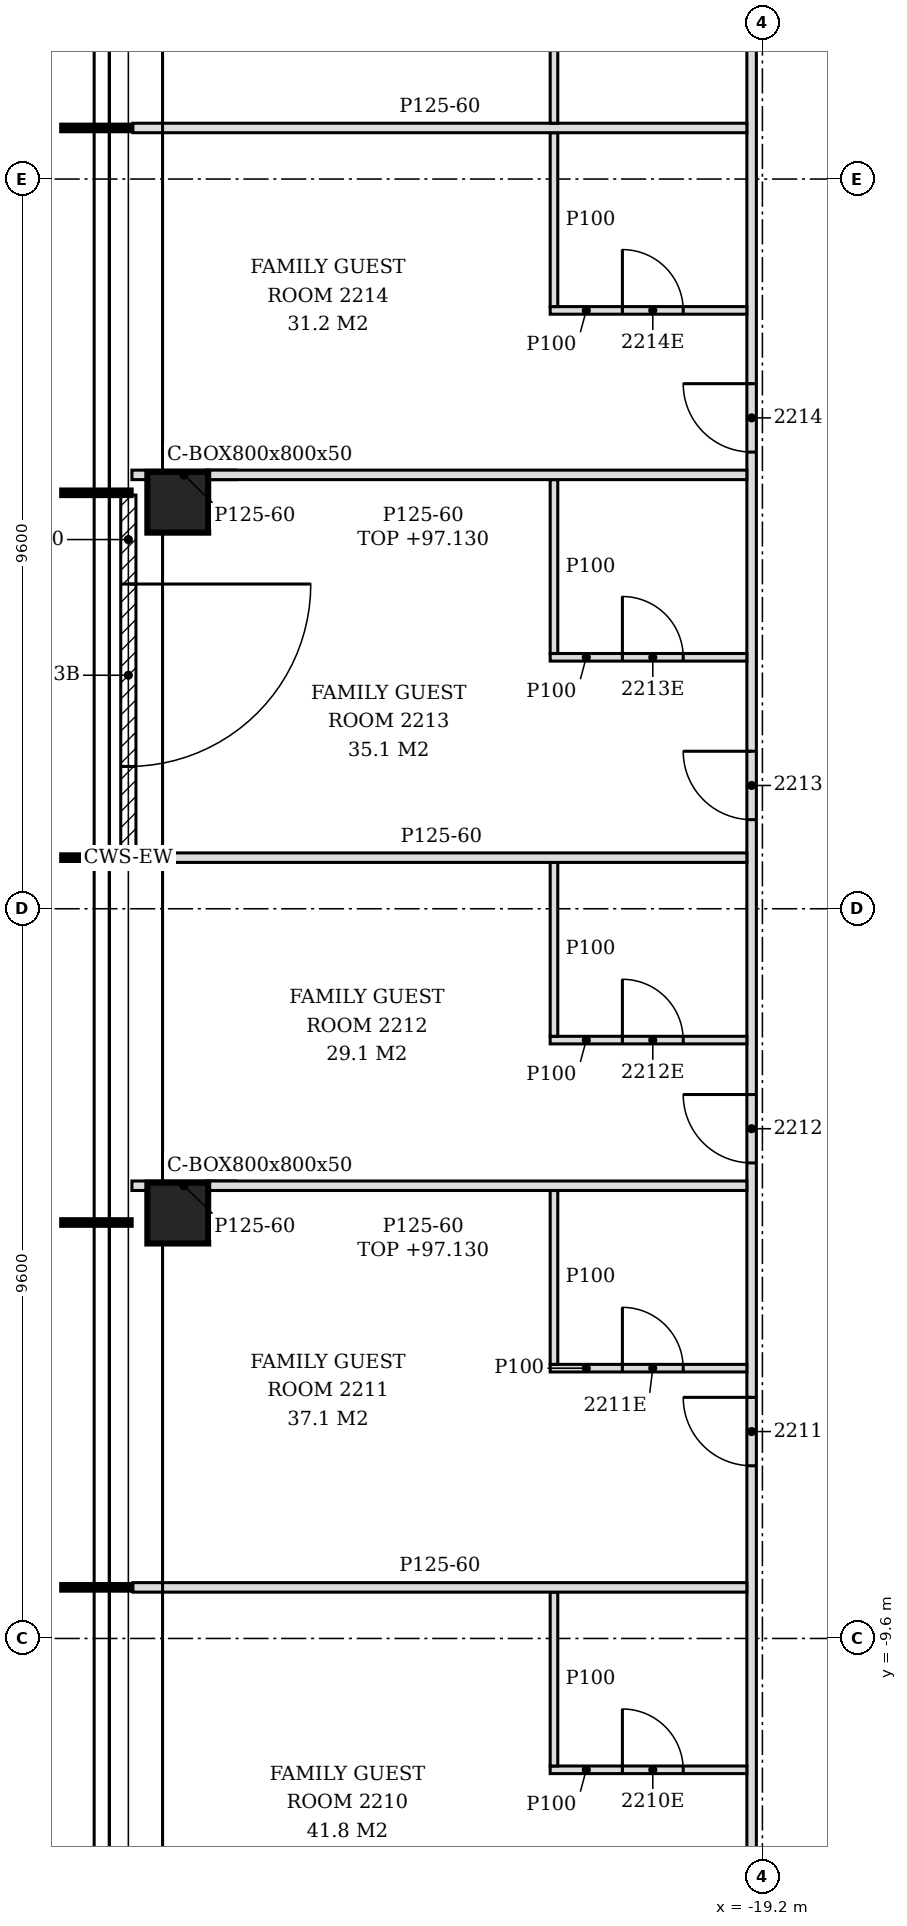
"""IFC4 building model, lengths in metres.
Left out: names, types, materials, properties, quantities, classifications, styles, units other than length and angle.
Written with IfcOpenShell. Run it as: python <this file> out.ifc"""

import sys

from ifc_helpers import new_model, si_unit, direction, frame, frame_2d, origin, origin_2d, place, context, subcontext, project, spatial, polyline, rectangle, hollow_rectangle, outline, extrude, clip, halfspace, element, fill, save


model = new_model("IFC4")
c1 = context("Model", 3, precision=1e-05, world=origin(), true_north=direction((0.0, 1.0)))
c2 = subcontext(c1, "Body", "Model", "MODEL_VIEW")
j1 = project(units=[si_unit("LENGTHUNIT", "METRE"), si_unit("PLANEANGLEUNIT", "RADIAN")], contexts=[c1])
p1 = place(None, origin())
s1 = spatial("IfcSite", under=j1, at=p1, CompositionType="ELEMENT")
p2 = place(p1, origin())
s2 = spatial("IfcBuilding", under=s1, at=p2, CompositionType="ELEMENT")
p3 = place(p2, frame((0.0, 0.0, 94.2)))
s3 = spatial("IfcBuildingStorey", under=s2, at=p3, CompositionType="ELEMENT", Elevation=94.2)
p4 = place(p3, frame((-26.892, 5.348, -0.15), z_axis=(0.281903412306, 0.18797814682, 0.940847852975), x_axis=(-0.554787109556, 0.83199234556, 0.0)))
e1 = element("IfcColumn", 1, at=p4, inside=s3, PredefinedType="COLUMN", context=c2, shape_type="Clipping", body=[
    clip(clip(extrude(hollow_rectangle(XDim=0.8, YDim=0.8, WallThickness=0.05, at=origin_2d()), origin(), (0.0, 0.0, 1.0), 3.826), halfspace(frame((0.0, 0.0, 0.024), z_axis=(0.0, 0.0, 1.0), x_axis=(1.0, 0.0, 0.0)), True)), halfspace(frame((0.0, 0.0, 3.802), z_axis=(0.0, 0.0, 1.0), x_axis=(1.0, 0.0, 0.0)), False)),
])
p5 = place(p3, frame((-26.892, -4.003, -0.15), z_axis=(0.281906793082, 0.187916592491, 0.940859136258), x_axis=(-0.554656732749, 0.832079268349, 0.0)))
e2 = element("IfcColumn", 2, at=p5, inside=s3, PredefinedType="COLUMN", context=c2, shape_type="Clipping", body=[
    clip(clip(extrude(hollow_rectangle(XDim=0.8, YDim=0.8, WallThickness=0.05, at=origin_2d()), origin(), (0.0, 0.0, 1.0), 3.826), halfspace(frame((0.0, 0.0, 0.024), z_axis=(0.0, 0.0, 1.0), x_axis=(1.0, 0.0, 0.0)), True)), halfspace(frame((0.0, 0.0, 3.802), z_axis=(0.0, 0.0, 1.0), x_axis=(1.0, 0.0, 0.0)), False)),
])
p6 = place(p3, frame((-26.892, -13.355, -0.15), z_axis=(0.281903412306, 0.18797814682, 0.940847852975), x_axis=(-0.554787109556, 0.83199234556, 0.0)))
e3 = element("IfcColumn", 3, at=p6, inside=s3, PredefinedType="COLUMN", context=c2, shape_type="Clipping", body=[
    clip(clip(extrude(hollow_rectangle(XDim=0.8, YDim=0.8, WallThickness=0.05, at=origin_2d()), origin(), (0.0, 0.0, 1.0), 3.826), halfspace(frame((0.0, 0.0, 0.024), z_axis=(0.0, 0.0, 1.0), x_axis=(1.0, 0.0, 0.0)), True)), halfspace(frame((0.0, 0.0, 3.802), z_axis=(0.0, 0.0, 1.0), x_axis=(1.0, 0.0, 0.0)), False)),
])
p7 = place(p3, frame((-27.542, 5.442, 0.0), z_axis=(0.0, 0.0, 1.0), x_axis=(0.0, -1.0, 0.0)))
e4 = element("IfcWall", 4, at=p7, inside=s3, PredefinedType="NOTDEFINED", context=c2, shape_type="SweptSolid", body=[
    extrude(rectangle(XDim=4.74, YDim=0.2, at=frame_2d((2.37, 0.0))), origin(), (0.0, 0.0, 1.0), 3.45),
])
p8 = place(p7, frame((1.17, 0.0, 0.0)))
e5 = element("IfcOpeningElement", 5, at=p8, cuts=e4, PredefinedType="OPENING", context=c2, shape_type="SweptSolid", body=[
    extrude(rectangle(XDim=2.4, YDim=2.4, at=frame_2d((1.2, 1.2))), frame((0.0, 0.11, 0.0), z_axis=(0.0, -1.0, 0.0), x_axis=(1.0, 0.0, 0.0)), (0.0, 0.0, 1.0), 0.22),
])
p9 = place(p3, frame((-19.342, -14.815, 0.0), z_axis=(0.0, 0.0, 1.0), x_axis=(0.0, 1.0, 0.0)))
e6 = element("IfcWall", 6, at=p9, inside=s3, PredefinedType="PARTITIONING", context=c2, shape_type="SweptSolid", body=[
    extrude(outline(polyline([(0.0, 0.0), (37.876, 0.0), (37.876, 3.45), (37.262, 3.45), (37.26, 2.63), (36.147, 2.63), (36.146, 3.45), (35.502, 3.45), (35.5, 2.98), (35.312, 2.98), (35.31, 3.45), (30.712, 3.45), (30.71, 2.88), (30.502, 2.88), (30.5, 3.45), (25.912, 3.45), (25.91, 2.88), (25.702, 2.88), (25.7, 3.45), (21.112, 3.45), (21.11, 2.88), (20.902, 2.88), (20.9, 3.45), (16.312, 3.45), (16.31, 2.88), (16.102, 2.88), (16.1, 3.45), (11.512, 3.45), (11.51, 2.88), (11.302, 2.88), (11.3, 3.45), (6.712, 3.45), (6.71, 2.88), (6.502, 2.88), (6.5, 3.45), (1.912, 3.45), (1.91, 2.88), (1.702, 2.88), (1.7, 3.45), (0.0, 3.45), (0.0, 0.0)])), frame((0.0, 0.062, 0.0), z_axis=(0.0, -1.0, 0.0), x_axis=(1.0, 0.0, 0.0)), (0.0, 0.0, 1.0), 0.125),
])
p10 = place(p9, frame((1.137, 0.0, 0.0)))
e7 = element("IfcOpeningElement", 7, at=p10, cuts=e6, PredefinedType="OPENING", context=c2, shape_type="SweptSolid", body=[
    extrude(rectangle(XDim=0.9, YDim=2.1, at=frame_2d((0.45, 1.05))), frame((0.0, 0.073, 0.0), z_axis=(0.0, -1.0, 0.0), x_axis=(1.0, 0.0, 0.0)), (0.0, 0.0, 1.0), 0.145),
])
p11 = place(p9, frame((7.488, 0.0, 0.0)))
e8 = element("IfcOpeningElement", 8, at=p11, cuts=e6, PredefinedType="OPENING", context=c2, shape_type="SweptSolid", body=[
    extrude(rectangle(XDim=0.9, YDim=2.1, at=frame_2d((0.45, 1.05))), frame((0.0, 0.073, 0.0), z_axis=(0.0, -1.0, 0.0), x_axis=(1.0, 0.0, 0.0)), (0.0, 0.0, 1.0), 0.145),
])
p12 = place(p9, frame((11.471, 0.0, 0.0)))
e9 = element("IfcOpeningElement", 9, at=p12, cuts=e6, PredefinedType="OPENING", context=c2, shape_type="SweptSolid", body=[
    extrude(rectangle(XDim=0.9, YDim=2.1, at=frame_2d((0.45, 1.05))), frame((0.0, 0.073, 0.0), z_axis=(0.0, -1.0, 0.0), x_axis=(1.0, 0.0, 0.0)), (0.0, 0.0, 1.0), 0.145),
])
p13 = place(p9, frame((15.988, 0.0, 0.0)))
e10 = element("IfcOpeningElement", 10, at=p13, cuts=e6, PredefinedType="OPENING", context=c2, shape_type="SweptSolid", body=[
    extrude(rectangle(XDim=0.9, YDim=2.1, at=frame_2d((0.45, 1.05))), frame((0.0, 0.073, 0.0), z_axis=(0.0, -1.0, 0.0), x_axis=(1.0, 0.0, 0.0)), (0.0, 0.0, 1.0), 0.145),
])
p14 = place(p9, frame((20.823, 0.0, 0.0)))
e11 = element("IfcOpeningElement", 11, at=p14, cuts=e6, PredefinedType="OPENING", context=c2, shape_type="SweptSolid", body=[
    extrude(rectangle(XDim=0.9, YDim=2.1, at=frame_2d((0.45, 1.05))), frame((0.0, 0.073, 0.0), z_axis=(0.0, -1.0, 0.0), x_axis=(1.0, 0.0, 0.0)), (0.0, 0.0, 1.0), 0.145),
])
p15 = place(p9, frame((28.315, 0.0, 0.0)))
e12 = element("IfcOpeningElement", 12, at=p15, cuts=e6, PredefinedType="OPENING", context=c2, shape_type="SweptSolid", body=[
    extrude(rectangle(XDim=0.9, YDim=2.1, at=frame_2d((0.45, 1.05))), frame((0.0, 0.073, 0.0), z_axis=(0.0, -1.0, 0.0), x_axis=(1.0, 0.0, 0.0)), (0.0, 0.0, 1.0), 0.145),
])
p16 = place(p9, frame((30.175, 0.0, 0.0)))
e13 = element("IfcOpeningElement", 13, at=p16, cuts=e6, PredefinedType="OPENING", context=c2, shape_type="SweptSolid", body=[
    extrude(rectangle(XDim=0.9, YDim=2.1, at=frame_2d((0.45, 1.05))), frame((0.0, 0.073, 0.0), z_axis=(0.0, -1.0, 0.0), x_axis=(1.0, 0.0, 0.0)), (0.0, 0.0, 1.0), 0.145),
])
p17 = place(p3, frame((-21.992, -11.328, 0.0), z_axis=(0.0, 0.0, 1.0), x_axis=(1.0, 0.0, 0.0)))
e14 = element("IfcWall", 14, at=p17, inside=s3, PredefinedType="PARTITIONING", context=c2, shape_type="SweptSolid", body=[
    extrude(rectangle(XDim=2.587, YDim=0.1, at=frame_2d((1.294, 0.0))), origin(), (0.0, 0.0, 1.0), 3.45),
])
p18 = place(p17, frame((0.95, 0.0, 0.0)))
e15 = element("IfcOpeningElement", 15, at=p18, cuts=e14, PredefinedType="OPENING", context=c2, shape_type="SweptSolid", body=[
    extrude(rectangle(XDim=0.8, YDim=2.1, at=frame_2d((0.4, 1.05))), frame((0.0, 0.06, 0.0), z_axis=(0.0, -1.0, 0.0), x_axis=(1.0, 0.0, 0.0)), (0.0, 0.0, 1.0), 0.12),
])
p19 = place(p3, frame((-21.942, -11.278, 0.0), z_axis=(0.0, 0.0, 1.0), x_axis=(0.0, 1.0, 0.0)))
e16 = element("IfcWall", 16, at=p19, inside=s3, PredefinedType="PARTITIONING", context=c2, shape_type="SweptSolid", body=[
    extrude(rectangle(XDim=2.288, YDim=0.1, at=frame_2d((1.144, 0.0))), origin(), (0.0, 0.0, 1.0), 3.45),
])
p20 = place(p3, frame((-27.482, -8.928, 0.0), z_axis=(0.0, 0.0, 1.0), x_axis=(1.0, 0.0, 0.0)))
e17 = element("IfcWall", 17, at=p20, inside=s3, PredefinedType="PARTITIONING", context=c2, shape_type="SweptSolid", body=[
    extrude(outline(polyline([(0.0, 0.0), (8.077, 0.0), (8.077, 3.45), (1.819, 3.45), (1.817, 2.93), (1.519, 2.93), (1.517, 3.45), (0.0, 3.45), (0.0, 0.0)])), frame((0.0, 0.062, 0.0), z_axis=(0.0, -1.0, 0.0), x_axis=(1.0, 0.0, 0.0)), (0.0, 0.0, 1.0), 0.125),
])
p21 = place(p3, frame((-21.992, -6.044, 0.0), z_axis=(0.0, 0.0, 1.0), x_axis=(1.0, 0.0, 0.0)))
e18 = element("IfcWall", 18, at=p21, inside=s3, PredefinedType="PARTITIONING", context=c2, shape_type="SweptSolid", body=[
    extrude(rectangle(XDim=2.587, YDim=0.1, at=frame_2d((1.294, 0.0))), origin(), (0.0, 0.0, 1.0), 3.45),
])
p22 = place(p21, frame((0.95, 0.0, 0.0)))
e19 = element("IfcOpeningElement", 19, at=p22, cuts=e18, PredefinedType="OPENING", context=c2, shape_type="SweptSolid", body=[
    extrude(rectangle(XDim=0.8, YDim=2.1, at=frame_2d((0.4, 1.05))), frame((0.0, 0.06, 0.0), z_axis=(0.0, -1.0, 0.0), x_axis=(1.0, 0.0, 0.0)), (0.0, 0.0, 1.0), 0.12),
])
p23 = place(p3, frame((-21.942, -5.994, 0.0), z_axis=(0.0, 0.0, 1.0), x_axis=(0.0, 1.0, 0.0)))
e20 = element("IfcWall", 20, at=p23, inside=s3, PredefinedType="PARTITIONING", context=c2, shape_type="SweptSolid", body=[
    extrude(rectangle(XDim=2.287, YDim=0.1, at=frame_2d((1.144, 0.0))), origin(), (0.0, 0.0, 1.0), 3.45),
])
p24 = place(p3, frame((-27.495, -3.644, 0.0), z_axis=(0.0, 0.0, 1.0), x_axis=(1.0, 0.0, 0.0)))
e21 = element("IfcWall", 21, at=p24, inside=s3, PredefinedType="PARTITIONING", context=c2, shape_type="SweptSolid", body=[
    extrude(outline(polyline([(0.0, 0.0), (0.327, 0.0), (0.331, 0.863), (0.622, 1.725), (0.996, 2.588), (1.369, 3.45), (0.0, 3.45), (0.0, 2.588), (0.0, 1.725), (0.0, 0.863), (0.0, 0.0)])), frame((0.0, 0.062, 0.0), z_axis=(0.0, -1.0, 0.0), x_axis=(1.0, 0.0, 0.0)), (0.0, 0.0, 1.0), 0.125),
])
p25 = place(p3, frame((-26.514, -3.644, 0.0), z_axis=(0.0, 0.0, 1.0), x_axis=(1.0, 0.0, 0.0)))
e22 = element("IfcWall", 22, at=p25, inside=s3, PredefinedType="PARTITIONING", context=c2, shape_type="SweptSolid", body=[
    extrude(outline(polyline([(0.0, 0.0), (7.109, 0.0), (7.109, 0.863), (7.109, 1.725), (7.109, 2.588), (7.109, 2.93), (0.976, 2.93), (0.976, 2.588), (0.747, 1.725), (0.373, 0.863), (0.0, 0.0)])), frame((0.0, 0.062, 0.0), z_axis=(0.0, -1.0, 0.0), x_axis=(1.0, 0.0, 0.0)), (0.0, 0.0, 1.0), 0.125),
])
p26 = place(p3, frame((-21.992, -1.728, 0.0), z_axis=(0.0, 0.0, 1.0), x_axis=(1.0, 0.0, 0.0)))
e23 = element("IfcWall", 23, at=p26, inside=s3, PredefinedType="PARTITIONING", context=c2, shape_type="SweptSolid", body=[
    extrude(rectangle(XDim=2.587, YDim=0.1, at=frame_2d((1.294, 0.0))), origin(), (0.0, 0.0, 1.0), 3.45),
])
p27 = place(p26, frame((0.95, 0.0, 0.0)))
e24 = element("IfcOpeningElement", 24, at=p27, cuts=e23, PredefinedType="OPENING", context=c2, shape_type="SweptSolid", body=[
    extrude(rectangle(XDim=0.8, YDim=2.1, at=frame_2d((0.4, 1.05))), frame((0.0, 0.06, 0.0), z_axis=(0.0, -1.0, 0.0), x_axis=(1.0, 0.0, 0.0)), (0.0, 0.0, 1.0), 0.12),
])
p28 = place(p3, frame((-21.942, -1.678, 0.0), z_axis=(0.0, 0.0, 1.0), x_axis=(0.0, 1.0, 0.0)))
e25 = element("IfcWall", 25, at=p28, inside=s3, PredefinedType="PARTITIONING", context=c2, shape_type="SweptSolid", body=[
    extrude(rectangle(XDim=2.288, YDim=0.1, at=frame_2d((1.144, 0.0))), origin(), (0.0, 0.0, 1.0), 3.45),
])
p29 = place(p3, frame((-27.442, 0.672, 0.0), z_axis=(0.0, 0.0, 1.0), x_axis=(1.0, 0.0, 0.0)))
e26 = element("IfcWall", 26, at=p29, inside=s3, PredefinedType="PARTITIONING", context=c2, shape_type="SweptSolid", body=[
    extrude(outline(polyline([(0.0, 0.0), (8.037, 0.0), (8.037, 3.45), (1.779, 3.45), (1.777, 2.93), (1.479, 2.93), (1.477, 3.45), (0.0, 3.45), (0.0, 0.0)])), frame((0.0, 0.062, 0.0), z_axis=(0.0, -1.0, 0.0), x_axis=(1.0, 0.0, 0.0)), (0.0, 0.0, 1.0), 0.125),
])
p30 = place(p3, frame((-21.992, 3.308, 0.0), z_axis=(0.0, 0.0, 1.0), x_axis=(1.0, 0.0, 0.0)))
e27 = element("IfcWall", 27, at=p30, inside=s3, PredefinedType="PARTITIONING", context=c2, shape_type="SweptSolid", body=[
    extrude(rectangle(XDim=2.587, YDim=0.1, at=frame_2d((1.294, 0.0))), origin(), (0.0, 0.0, 1.0), 3.45),
])
p31 = place(p30, frame((0.95, 0.0, 0.0)))
e28 = element("IfcOpeningElement", 28, at=p31, cuts=e27, PredefinedType="OPENING", context=c2, shape_type="SweptSolid", body=[
    extrude(rectangle(XDim=0.8, YDim=2.1, at=frame_2d((0.4, 1.05))), frame((0.0, 0.06, 0.0), z_axis=(0.0, -1.0, 0.0), x_axis=(1.0, 0.0, 0.0)), (0.0, 0.0, 1.0), 0.12),
])
p32 = place(p3, frame((-21.942, 3.358, 0.0), z_axis=(0.0, 0.0, 1.0), x_axis=(0.0, 1.0, 0.0)))
e29 = element("IfcWall", 29, at=p32, inside=s3, PredefinedType="PARTITIONING", context=c2, shape_type="SweptSolid", body=[
    extrude(rectangle(XDim=2.288, YDim=0.1, at=frame_2d((1.144, 0.0))), origin(), (0.0, 0.0, 1.0), 3.45),
])
p33 = place(p3, frame((-27.495, 5.708, 0.0), z_axis=(0.0, 0.0, 1.0), x_axis=(1.0, 0.0, 0.0)))
e30 = element("IfcWall", 30, at=p33, inside=s3, PredefinedType="PARTITIONING", context=c2, shape_type="SweptSolid", body=[
    extrude(outline(polyline([(0.0, 0.0), (0.328, 0.0), (0.331, 0.863), (0.622, 1.725), (0.995, 2.588), (1.368, 3.45), (0.0, 3.45), (0.0, 2.588), (0.0, 1.725), (0.0, 0.863), (0.0, 0.0)])), frame((0.0, 0.062, 0.0), z_axis=(0.0, -1.0, 0.0), x_axis=(1.0, 0.0, 0.0)), (0.0, 0.0, 1.0), 0.125),
])
p34 = place(p3, frame((-26.514, 5.708, 0.0), z_axis=(0.0, 0.0, 1.0), x_axis=(1.0, 0.0, 0.0)))
e31 = element("IfcWall", 31, at=p34, inside=s3, PredefinedType="PARTITIONING", context=c2, shape_type="SweptSolid", body=[
    extrude(outline(polyline([(0.0, 0.0), (7.11, 0.0), (7.11, 0.863), (7.11, 1.725), (7.11, 2.588), (7.11, 2.93), (0.977, 2.93), (0.977, 2.588), (0.747, 1.725), (0.373, 0.863), (0.0, 0.0)])), frame((0.0, 0.062, 0.0), z_axis=(0.0, -1.0, 0.0), x_axis=(1.0, 0.0, 0.0)), (0.0, 0.0, 1.0), 0.125),
])
p35 = place(p3, frame((-21.992, 7.872, 0.0), z_axis=(0.0, 0.0, 1.0), x_axis=(1.0, 0.0, 0.0)))
e32 = element("IfcWall", 32, at=p35, inside=s3, PredefinedType="PARTITIONING", context=c2, shape_type="SweptSolid", body=[
    extrude(rectangle(XDim=2.587, YDim=0.1, at=frame_2d((1.294, 0.0))), origin(), (0.0, 0.0, 1.0), 3.45),
])
p36 = place(p35, frame((0.95, 0.0, 0.0)))
e33 = element("IfcOpeningElement", 33, at=p36, cuts=e32, PredefinedType="OPENING", context=c2, shape_type="SweptSolid", body=[
    extrude(rectangle(XDim=0.8, YDim=2.1, at=frame_2d((0.4, 1.05))), frame((0.0, 0.06, 0.0), z_axis=(0.0, -1.0, 0.0), x_axis=(1.0, 0.0, 0.0)), (0.0, 0.0, 1.0), 0.12),
])
p37 = place(p3, frame((-21.942, 7.922, 0.0), z_axis=(0.0, 0.0, 1.0), x_axis=(0.0, 1.0, 0.0)))
e34 = element("IfcWall", 34, at=p37, inside=s3, PredefinedType="PARTITIONING", context=c2, shape_type="SweptSolid", body=[
    extrude(rectangle(XDim=2.287, YDim=0.1, at=frame_2d((1.144, 0.0))), origin(), (0.0, 0.0, 1.0), 3.45),
])
p38 = place(p3, frame((-27.482, 10.272, 0.0), z_axis=(0.0, 0.0, 1.0), x_axis=(1.0, 0.0, 0.0)))
e35 = element("IfcWall", 35, at=p38, inside=s3, PredefinedType="PARTITIONING", context=c2, shape_type="SweptSolid", body=[
    extrude(outline(polyline([(0.0, 0.0), (8.077, 0.0), (8.077, 3.45), (1.819, 3.45), (1.817, 2.93), (1.519, 2.93), (1.517, 3.45), (0.0, 3.45), (0.0, 0.0)])), frame((0.0, 0.062, 0.0), z_axis=(0.0, -1.0, 0.0), x_axis=(1.0, 0.0, 0.0)), (0.0, 0.0, 1.0), 0.125),
])
p39 = place(p3, frame((-21.942, 10.334, 0.0), z_axis=(0.0, 0.0, 1.0), x_axis=(0.0, 1.0, 0.0)))
e36 = element("IfcWall", 36, at=p39, inside=s3, PredefinedType="PARTITIONING", context=c2, shape_type="SweptSolid", body=[
    extrude(outline(polyline([(0.0, 0.0), (2.288, 0.0), (2.288, 3.45), (0.762, 3.45), (0.76, 2.88), (0.552, 2.88), (0.55, 3.45), (0.0, 3.45), (0.0, 0.0)])), frame((0.0, 0.05, 0.0), z_axis=(0.0, -1.0, 0.0), x_axis=(1.0, 0.0, 0.0)), (0.0, 0.0, 1.0), 0.1),
])
p40 = place(p8, origin())
e37 = element("IfcDoor", 37, at=p40, inside=s3, OperationType="SINGLE_SWING_LEFT", PredefinedType="DOOR", context=c2, shape_type="SweptSolid", body=[
    extrude(rectangle(XDim=2.4, YDim=2.4, at=frame_2d((1.2, 1.2))), frame((0.0, 0.025, 0.0), z_axis=(0.0, -1.0, 0.0), x_axis=(1.0, 0.0, 0.0)), (0.0, 0.0, 1.0), 0.05),
])
fill(e5, e37)
p41 = place(p18, origin())
e38 = element("IfcDoor", 38, at=p41, inside=s3, OperationType="SINGLE_SWING_LEFT", PredefinedType="DOOR", context=c2, shape_type="SweptSolid", body=[
    extrude(rectangle(XDim=0.8, YDim=2.1, at=frame_2d((0.4, 1.05))), frame((0.0, 0.025, 0.0), z_axis=(0.0, -1.0, 0.0), x_axis=(1.0, 0.0, 0.0)), (0.0, 0.0, 1.0), 0.05),
])
fill(e15, e38)
p42 = place(p11, origin())
e39 = element("IfcDoor", 39, at=p42, inside=s3, OperationType="SINGLE_SWING_RIGHT", PredefinedType="DOOR", context=c2, shape_type="SweptSolid", body=[
    extrude(rectangle(XDim=0.9, YDim=2.1, at=frame_2d((0.45, 1.05))), frame((0.0, 0.025, 0.0), z_axis=(0.0, -1.0, 0.0), x_axis=(1.0, 0.0, 0.0)), (0.0, 0.0, 1.0), 0.05),
])
fill(e8, e39)
p43 = place(p22, origin())
e40 = element("IfcDoor", 40, at=p43, inside=s3, OperationType="SINGLE_SWING_LEFT", PredefinedType="DOOR", context=c2, shape_type="SweptSolid", body=[
    extrude(rectangle(XDim=0.8, YDim=2.1, at=frame_2d((0.4, 1.05))), frame((0.0, 0.025, 0.0), z_axis=(0.0, -1.0, 0.0), x_axis=(1.0, 0.0, 0.0)), (0.0, 0.0, 1.0), 0.05),
])
fill(e19, e40)
p44 = place(p12, origin())
e41 = element("IfcDoor", 41, at=p44, inside=s3, OperationType="SINGLE_SWING_RIGHT", PredefinedType="DOOR", context=c2, shape_type="SweptSolid", body=[
    extrude(rectangle(XDim=0.9, YDim=2.1, at=frame_2d((0.45, 1.05))), frame((0.0, 0.025, 0.0), z_axis=(0.0, -1.0, 0.0), x_axis=(1.0, 0.0, 0.0)), (0.0, 0.0, 1.0), 0.05),
])
fill(e9, e41)
p45 = place(p27, origin())
e42 = element("IfcDoor", 42, at=p45, inside=s3, OperationType="SINGLE_SWING_LEFT", PredefinedType="DOOR", context=c2, shape_type="SweptSolid", body=[
    extrude(rectangle(XDim=0.8, YDim=2.1, at=frame_2d((0.4, 1.05))), frame((0.0, 0.025, 0.0), z_axis=(0.0, -1.0, 0.0), x_axis=(1.0, 0.0, 0.0)), (0.0, 0.0, 1.0), 0.05),
])
fill(e24, e42)
p46 = place(p13, origin())
e43 = element("IfcDoor", 43, at=p46, inside=s3, OperationType="SINGLE_SWING_RIGHT", PredefinedType="DOOR", context=c2, shape_type="SweptSolid", body=[
    extrude(rectangle(XDim=0.9, YDim=2.1, at=frame_2d((0.45, 1.05))), frame((0.0, 0.025, 0.0), z_axis=(0.0, -1.0, 0.0), x_axis=(1.0, 0.0, 0.0)), (0.0, 0.0, 1.0), 0.05),
])
fill(e10, e43)
p47 = place(p31, origin())
e44 = element("IfcDoor", 44, at=p47, inside=s3, OperationType="SINGLE_SWING_LEFT", PredefinedType="DOOR", context=c2, shape_type="SweptSolid", body=[
    extrude(rectangle(XDim=0.8, YDim=2.1, at=frame_2d((0.4, 1.05))), frame((0.0, 0.025, 0.0), z_axis=(0.0, -1.0, 0.0), x_axis=(1.0, 0.0, 0.0)), (0.0, 0.0, 1.0), 0.05),
])
fill(e28, e44)
p48 = place(p14, origin())
e45 = element("IfcDoor", 45, at=p48, inside=s3, OperationType="SINGLE_SWING_RIGHT", PredefinedType="DOOR", context=c2, shape_type="SweptSolid", body=[
    extrude(rectangle(XDim=0.9, YDim=2.1, at=frame_2d((0.45, 1.05))), frame((0.0, 0.025, 0.0), z_axis=(0.0, -1.0, 0.0), x_axis=(1.0, 0.0, 0.0)), (0.0, 0.0, 1.0), 0.05),
])
fill(e11, e45)
p49 = place(p36, origin())
e46 = element("IfcDoor", 46, at=p49, inside=s3, OperationType="SINGLE_SWING_LEFT", PredefinedType="DOOR", context=c2, shape_type="SweptSolid", body=[
    extrude(rectangle(XDim=0.8, YDim=2.1, at=frame_2d((0.4, 1.05))), frame((0.0, 0.025, 0.0), z_axis=(0.0, -1.0, 0.0), x_axis=(1.0, 0.0, 0.0)), (0.0, 0.0, 1.0), 0.05),
])
fill(e33, e46)
save(model, sys.argv[1])
